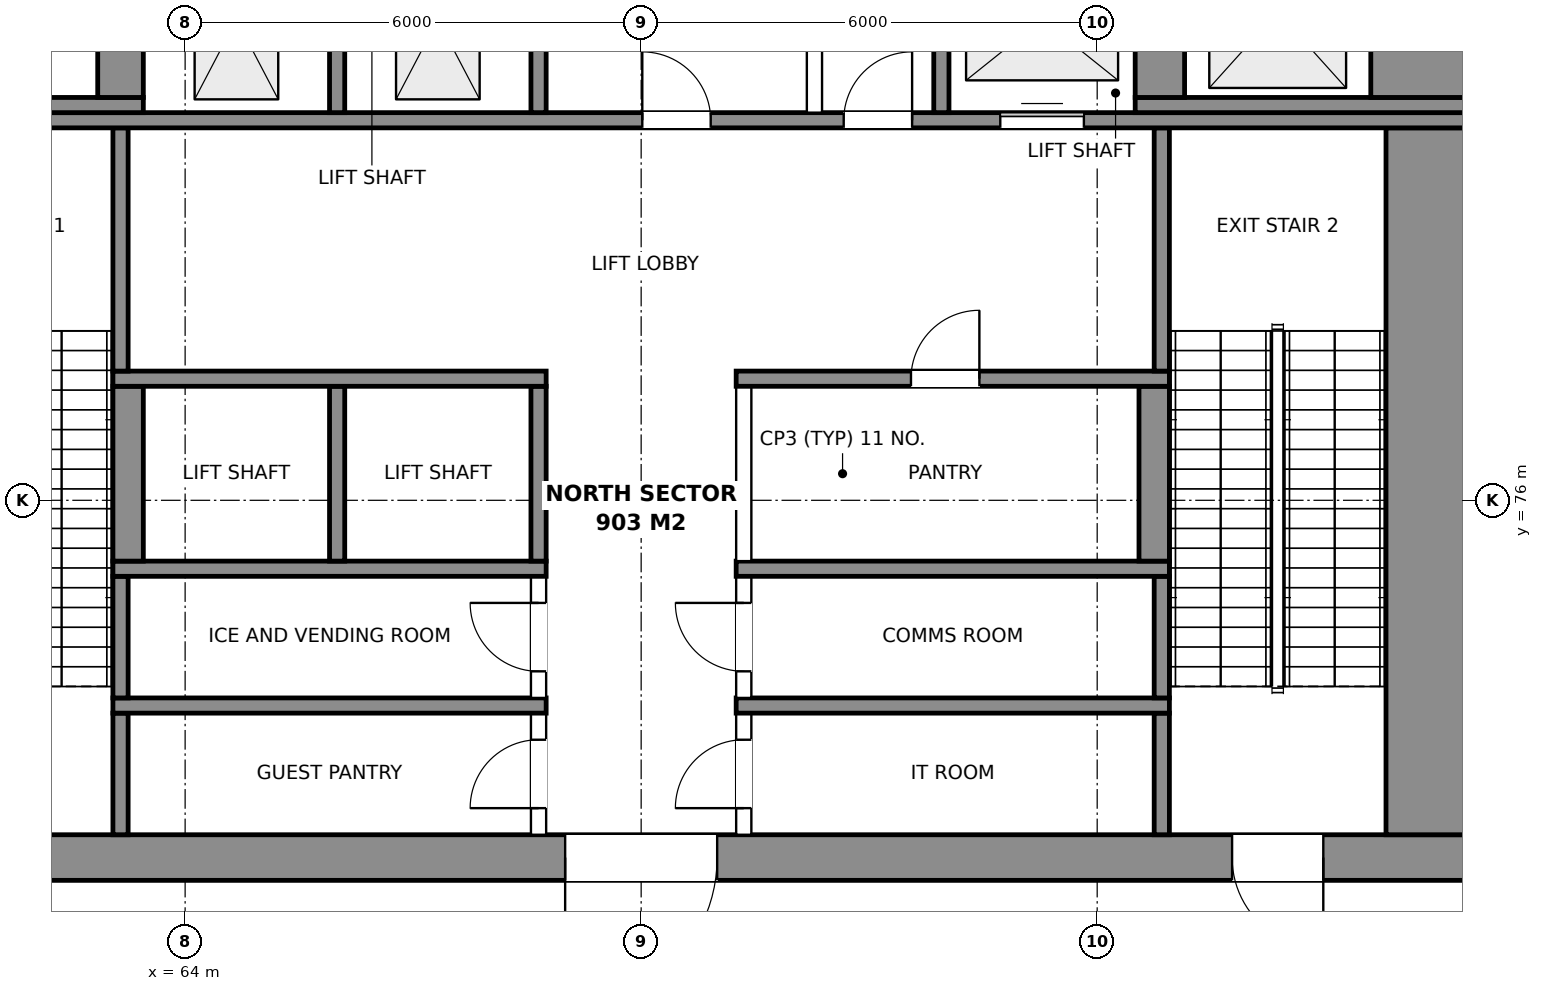
"""IFC4 building model, lengths in metres.
Left out: names, types, materials, properties, quantities, classifications, styles, units other than length and angle.
Written with IfcOpenShell. Run it as: python <this file> out.ifc"""

import sys

from ifc_helpers import new_model, si_unit, direction, frame, frame_2d, origin, place, context, subcontext, project, spatial, rectangle, extrude, element, fill, save


model = new_model("IFC4")
c1 = context("Model", 3, precision=1e-05, world=origin(), true_north=direction((0.0, 1.0)))
c2 = subcontext(c1, "Body", "Model", "MODEL_VIEW")
j1 = project(units=[si_unit("LENGTHUNIT", "METRE"), si_unit("PLANEANGLEUNIT", "RADIAN")], contexts=[c1])
p1 = place(None, origin())
s1 = spatial("IfcSite", under=j1, at=p1, CompositionType="ELEMENT")
p2 = place(p1, origin())
s2 = spatial("IfcBuilding", under=s1, at=p2, CompositionType="ELEMENT")
p3 = place(p2, frame((0.0, 0.0, 321.7)))
s3 = spatial("IfcBuildingStorey", under=s2, at=p3, CompositionType="ELEMENT", Elevation=321.7)
p4 = place(p3, frame((59.0, 71.3, 0.0), z_axis=(0.0, 0.0, 1.0), x_axis=(1.0, 0.0, 0.0)))
e1 = element("IfcWall", 1, at=p4, inside=s3, PredefinedType="SHEAR", context=c2, shape_type="SweptSolid", body=[
    extrude(rectangle(XDim=22.0, YDim=0.6, at=frame_2d((11.0, 0.0))), origin(), (0.0, 0.0, 1.0), 7.0),
])
p5 = place(p4, frame((2.025, 0.0, 0.0)))
e2 = element("IfcOpeningElement", 2, at=p5, cuts=e1, PredefinedType="OPENING", context=c2, shape_type="SweptSolid", body=[
    extrude(rectangle(XDim=1.2, YDim=2.1, at=frame_2d((0.6, 1.05))), frame((0.0, 0.31, 0.0), z_axis=(0.0, -1.0, 0.0), x_axis=(1.0, 0.0, 0.0)), (0.0, 0.0, 1.0), 0.62),
])
p6 = place(p4, frame((18.775, 0.0, 0.0)))
e3 = element("IfcOpeningElement", 3, at=p6, cuts=e1, PredefinedType="OPENING", context=c2, shape_type="SweptSolid", body=[
    extrude(rectangle(XDim=1.2, YDim=2.1, at=frame_2d((0.6, 1.05))), frame((0.0, 0.31, 0.0), z_axis=(0.0, -1.0, 0.0), x_axis=(1.0, 0.0, 0.0)), (0.0, 0.0, 1.0), 0.62),
])
p7 = place(p4, frame((10.0, 0.0, 0.0)))
e4 = element("IfcOpeningElement", 4, at=p7, cuts=e1, PredefinedType="OPENING", context=c2, shape_type="SweptSolid", body=[
    extrude(rectangle(XDim=2.0, YDim=2.1, at=frame_2d((1.0, 1.05))), frame((0.0, 0.31, 0.0), z_axis=(0.0, -1.0, 0.0), x_axis=(1.0, 0.0, 0.0)), (0.0, 0.0, 1.0), 0.62),
])
p8 = place(p3, frame((63.15, 71.6, 0.0), z_axis=(0.0, 0.0, 1.0), x_axis=(0.0, 1.0, 0.0)))
e5 = element("IfcWall", 5, at=p8, inside=s3, PredefinedType="SHEAR", context=c2, shape_type="SweptSolid", body=[
    extrude(rectangle(XDim=1.6, YDim=0.2, at=frame_2d((0.8, 0.0))), origin(), (0.0, 0.0, 1.0), 7.0),
])
p9 = place(p3, frame((68.65, 71.6, 0.0), z_axis=(0.0, 0.0, 1.0), x_axis=(0.0, 1.0, 0.0)))
e6 = element("IfcWall", 6, at=p9, inside=s3, PredefinedType="PARTITIONING", context=c2, shape_type="SweptSolid", body=[
    extrude(rectangle(XDim=1.6, YDim=0.2, at=frame_2d((0.8, 0.0))), origin(), (0.0, 0.0, 1.0), 6.7),
])
p10 = place(p9, frame((0.35, 0.0, 0.0)))
e7 = element("IfcOpeningElement", 7, at=p10, cuts=e6, PredefinedType="OPENING", context=c2, shape_type="SweptSolid", body=[
    extrude(rectangle(XDim=0.9, YDim=2.1, at=frame_2d((0.45, 1.05))), frame((0.0, 0.11, 0.0), z_axis=(0.0, -1.0, 0.0), x_axis=(1.0, 0.0, 0.0)), (0.0, 0.0, 1.0), 0.22),
])
p11 = place(p3, frame((71.35, 71.6, 0.0), z_axis=(0.0, 0.0, 1.0), x_axis=(0.0, 1.0, 0.0)))
e8 = element("IfcWall", 8, at=p11, inside=s3, PredefinedType="PARTITIONING", context=c2, shape_type="SweptSolid", body=[
    extrude(rectangle(XDim=1.6, YDim=0.2, at=frame_2d((0.8, 0.0))), origin(), (0.0, 0.0, 1.0), 6.7),
])
p12 = place(p11, frame((0.35, 0.0, 0.0)))
e9 = element("IfcOpeningElement", 9, at=p12, cuts=e8, PredefinedType="OPENING", context=c2, shape_type="SweptSolid", body=[
    extrude(rectangle(XDim=0.9, YDim=2.1, at=frame_2d((0.45, 1.05))), frame((0.0, 0.11, 0.0), z_axis=(0.0, -1.0, 0.0), x_axis=(1.0, 0.0, 0.0)), (0.0, 0.0, 1.0), 0.22),
])
p13 = place(p3, frame((76.85, 71.6, 0.0), z_axis=(0.0, 0.0, 1.0), x_axis=(0.0, 1.0, 0.0)))
e10 = element("IfcWall", 10, at=p13, inside=s3, PredefinedType="SHEAR", context=c2, shape_type="SweptSolid", body=[
    extrude(rectangle(XDim=1.6, YDim=0.2, at=frame_2d((0.8, 0.0))), origin(), (0.0, 0.0, 1.0), 7.0),
])
p14 = place(p3, frame((80.4, 71.6, 0.0), z_axis=(0.0, 0.0, 1.0), x_axis=(0.0, 1.0, 0.0)))
e11 = element("IfcWall", 11, at=p14, inside=s3, PredefinedType="SHEAR", context=c2, shape_type="SweptSolid", body=[
    extrude(rectangle(XDim=9.3, YDim=1.2, at=frame_2d((4.65, 0.0))), origin(), (0.0, 0.0, 1.0), 7.0),
])
for number, where, z_axis, x_axis in (
    (12, (63.05, 73.3, 0.0), (0.0, 0.0, 1.0), (1.0, 0.0, 0.0)),
    (13, (71.25, 73.3, 0.0), (0.0, 0.0, 1.0), (1.0, 0.0, 0.0)),
):
    element("IfcWall", number, at=place(p3, frame(where, z_axis=z_axis, x_axis=x_axis)), inside=s3, PredefinedType="SHEAR", context=c2, shape_type="SweptSolid", body=[
        extrude(rectangle(XDim=5.7, YDim=0.2, at=frame_2d((2.85, 0.0))), origin(), (0.0, 0.0, 1.0), 7.0),
    ])
p15 = place(p3, frame((63.15, 73.4, 0.0), z_axis=(0.0, 0.0, 1.0), x_axis=(0.0, 1.0, 0.0)))
e14 = element("IfcWall", 14, at=p15, inside=s3, PredefinedType="SHEAR", context=c2, shape_type="SweptSolid", body=[
    extrude(rectangle(XDim=1.6, YDim=0.2, at=frame_2d((0.8, 0.0))), origin(), (0.0, 0.0, 1.0), 7.0),
])
p16 = place(p3, frame((68.65, 73.4, 0.0), z_axis=(0.0, 0.0, 1.0), x_axis=(0.0, 1.0, 0.0)))
e15 = element("IfcWall", 15, at=p16, inside=s3, PredefinedType="PARTITIONING", context=c2, shape_type="SweptSolid", body=[
    extrude(rectangle(XDim=1.6, YDim=0.2, at=frame_2d((0.8, 0.0))), origin(), (0.0, 0.0, 1.0), 6.7),
])
p17 = place(p16, frame((0.35, 0.0, 0.0)))
e16 = element("IfcOpeningElement", 16, at=p17, cuts=e15, PredefinedType="OPENING", context=c2, shape_type="SweptSolid", body=[
    extrude(rectangle(XDim=0.9, YDim=2.1, at=frame_2d((0.45, 1.05))), frame((0.0, 0.11, 0.0), z_axis=(0.0, -1.0, 0.0), x_axis=(1.0, 0.0, 0.0)), (0.0, 0.0, 1.0), 0.22),
])
p18 = place(p3, frame((71.35, 73.4, 0.0), z_axis=(0.0, 0.0, 1.0), x_axis=(0.0, 1.0, 0.0)))
e17 = element("IfcWall", 17, at=p18, inside=s3, PredefinedType="PARTITIONING", context=c2, shape_type="SweptSolid", body=[
    extrude(rectangle(XDim=1.6, YDim=0.2, at=frame_2d((0.8, 0.0))), origin(), (0.0, 0.0, 1.0), 6.7),
])
p19 = place(p18, frame((0.35, 0.0, 0.0)))
e18 = element("IfcOpeningElement", 18, at=p19, cuts=e17, PredefinedType="OPENING", context=c2, shape_type="SweptSolid", body=[
    extrude(rectangle(XDim=0.9, YDim=2.1, at=frame_2d((0.45, 1.05))), frame((0.0, 0.11, 0.0), z_axis=(0.0, -1.0, 0.0), x_axis=(1.0, 0.0, 0.0)), (0.0, 0.0, 1.0), 0.22),
])
p20 = place(p3, frame((76.85, 73.4, 0.0), z_axis=(0.0, 0.0, 1.0), x_axis=(0.0, 1.0, 0.0)))
e19 = element("IfcWall", 19, at=p20, inside=s3, PredefinedType="SHEAR", context=c2, shape_type="SweptSolid", body=[
    extrude(rectangle(XDim=1.6, YDim=0.2, at=frame_2d((0.8, 0.0))), origin(), (0.0, 0.0, 1.0), 7.0),
])
for number, where, z_axis, x_axis in (
    (20, (63.05, 75.1, 0.0), (0.0, 0.0, 1.0), (1.0, 0.0, 0.0)),
    (21, (71.25, 75.1, 0.0), (0.0, 0.0, 1.0), (1.0, 0.0, 0.0)),
):
    element("IfcWall", number, at=place(p3, frame(where, z_axis=z_axis, x_axis=x_axis)), inside=s3, PredefinedType="SHEAR", context=c2, shape_type="SweptSolid", body=[
        extrude(rectangle(XDim=5.7, YDim=0.2, at=frame_2d((2.85, 0.0))), origin(), (0.0, 0.0, 1.0), 7.0),
    ])
p21 = place(p3, frame((63.25, 75.2, 0.0), z_axis=(0.0, 0.0, 1.0), x_axis=(0.0, 1.0, 0.0)))
e22 = element("IfcWall", 22, at=p21, inside=s3, PredefinedType="SHEAR", context=c2, shape_type="SweptSolid", body=[
    extrude(rectangle(XDim=2.3, YDim=0.4, at=frame_2d((1.15, 0.0))), origin(), (0.0, 0.0, 1.0), 7.0),
])
for number, where, z_axis, x_axis in (
    (23, (66.0, 75.2, 0.0), (0.0, 0.0, 1.0), (0.0, 1.0, 0.0)),
    (24, (68.65, 75.2, 0.0), (0.0, 0.0, 1.0), (0.0, 1.0, 0.0)),
):
    element("IfcWall", number, at=place(p3, frame(where, z_axis=z_axis, x_axis=x_axis)), inside=s3, PredefinedType="SHEAR", context=c2, shape_type="SweptSolid", body=[
        extrude(rectangle(XDim=2.3, YDim=0.2, at=frame_2d((1.15, 0.0))), origin(), (0.0, 0.0, 1.0), 7.0),
    ])
p22 = place(p3, frame((71.35, 75.2, 0.0), z_axis=(0.0, 0.0, 1.0), x_axis=(0.0, 1.0, 0.0)))
e25 = element("IfcWall", 25, at=p22, inside=s3, PredefinedType="PARTITIONING", context=c2, shape_type="SweptSolid", body=[
    extrude(rectangle(XDim=2.3, YDim=0.2, at=frame_2d((1.15, 0.0))), origin(), (0.0, 0.0, 1.0), 6.7),
])
p23 = place(p3, frame((76.75, 75.2, 0.0), z_axis=(0.0, 0.0, 1.0), x_axis=(0.0, 1.0, 0.0)))
e26 = element("IfcWall", 26, at=p23, inside=s3, PredefinedType="SHEAR", context=c2, shape_type="SweptSolid", body=[
    extrude(rectangle(XDim=2.3, YDim=0.4, at=frame_2d((1.15, 0.0))), origin(), (0.0, 0.0, 1.0), 7.0),
])
p24 = place(p3, frame((63.05, 77.6, 0.0), z_axis=(0.0, 0.0, 1.0), x_axis=(1.0, 0.0, 0.0)))
e27 = element("IfcWall", 27, at=p24, inside=s3, PredefinedType="SHEAR", context=c2, shape_type="SweptSolid", body=[
    extrude(rectangle(XDim=5.7, YDim=0.2, at=frame_2d((2.85, 0.0))), origin(), (0.0, 0.0, 1.0), 7.0),
])
p25 = place(p3, frame((71.25, 77.6, 0.0), z_axis=(0.0, 0.0, 1.0), x_axis=(1.0, 0.0, 0.0)))
e28 = element("IfcWall", 28, at=p25, inside=s3, PredefinedType="SHEAR", context=c2, shape_type="SweptSolid", body=[
    extrude(rectangle(XDim=5.7, YDim=0.2, at=frame_2d((2.85, 0.0))), origin(), (0.0, 0.0, 1.0), 7.0),
])
p26 = place(p25, frame((2.3, 0.0, 0.0)))
e29 = element("IfcOpeningElement", 29, at=p26, cuts=e28, PredefinedType="OPENING", context=c2, shape_type="SweptSolid", body=[
    extrude(rectangle(XDim=0.9, YDim=2.1, at=frame_2d((0.45, 1.05))), frame((0.0, 0.11, 0.0), z_axis=(0.0, -1.0, 0.0), x_axis=(1.0, 0.0, 0.0)), (0.0, 0.0, 1.0), 0.22),
])
for number, where, z_axis, x_axis in (
    (30, (63.15, 77.7, 0.0), (0.0, 0.0, 1.0), (0.0, 1.0, 0.0)),
    (31, (76.85, 77.7, 0.0), (0.0, 0.0, 1.0), (0.0, 1.0, 0.0)),
):
    element("IfcWall", number, at=place(p3, frame(where, z_axis=z_axis, x_axis=x_axis)), inside=s3, PredefinedType="SHEAR", context=c2, shape_type="SweptSolid", body=[
        extrude(rectangle(XDim=3.2, YDim=0.2, at=frame_2d((1.6, 0.0))), origin(), (0.0, 0.0, 1.0), 7.0),
    ])
p27 = place(p3, frame((59.0, 81.0, 0.0), z_axis=(0.0, 0.0, 1.0), x_axis=(1.0, 0.0, 0.0)))
e32 = element("IfcWall", 32, at=p27, inside=s3, PredefinedType="SHEAR", context=c2, shape_type="SweptSolid", body=[
    extrude(rectangle(XDim=22.0, YDim=0.2, at=frame_2d((11.0, 0.0))), origin(), (0.0, 0.0, 1.0), 7.0),
])
p28 = place(p27, frame((15.725, 0.0, 0.0)))
e33 = element("IfcOpeningElement", 33, at=p28, cuts=e32, PredefinedType="OPENING", context=c2, shape_type="SweptSolid", body=[
    extrude(rectangle(XDim=1.1, YDim=2.1, at=frame_2d((0.55, 1.05))), frame((0.0, 0.11, 0.0), z_axis=(0.0, -1.0, 0.0), x_axis=(1.0, 0.0, 0.0)), (0.0, 0.0, 1.0), 0.22),
])
p29 = place(p27, frame((11.015, 0.0, 0.0)))
e34 = element("IfcOpeningElement", 34, at=p29, cuts=e32, PredefinedType="OPENING", context=c2, shape_type="SweptSolid", body=[
    extrude(rectangle(XDim=0.9, YDim=2.1, at=frame_2d((0.45, 1.05))), frame((0.0, 0.11, 0.0), z_axis=(0.0, -1.0, 0.0), x_axis=(1.0, 0.0, 0.0)), (0.0, 0.0, 1.0), 0.22),
])
p30 = place(p27, frame((13.665, 0.0, 0.0)))
e35 = element("IfcOpeningElement", 35, at=p30, cuts=e32, PredefinedType="OPENING", context=c2, shape_type="SweptSolid", body=[
    extrude(rectangle(XDim=0.9, YDim=2.1, at=frame_2d((0.45, 1.05))), frame((0.0, 0.11, 0.0), z_axis=(0.0, -1.0, 0.0), x_axis=(1.0, 0.0, 0.0)), (0.0, 0.0, 1.0), 0.22),
])
p31 = place(p3, frame((59.0, 81.2, 0.0), z_axis=(0.0, 0.0, 1.0), x_axis=(1.0, 0.0, 0.0)))
e36 = element("IfcWall", 36, at=p31, inside=s3, PredefinedType="SHEAR", context=c2, shape_type="SweptSolid", body=[
    extrude(rectangle(XDim=4.45, YDim=0.2, at=frame_2d((2.225, 0.0))), origin(), (0.0, 0.0, 1.0), 7.0),
])
for number, where, z_axis, x_axis in (
    (37, (66.0, 81.1, 0.0), (0.0, 0.0, 1.0), (0.0, 1.0, 0.0)),
    (38, (68.65, 81.1, 0.0), (0.0, 0.0, 1.0), (0.0, 1.0, 0.0)),
):
    element("IfcWall", number, at=place(p3, frame(where, z_axis=z_axis, x_axis=x_axis)), inside=s3, PredefinedType="SHEAR", context=c2, shape_type="SweptSolid", body=[
        extrude(rectangle(XDim=2.45, YDim=0.2, at=frame_2d((1.225, 0.0))), origin(), (0.0, 0.0, 1.0), 7.0),
    ])
p32 = place(p3, frame((72.28, 81.1, 0.0), z_axis=(0.0, 0.0, 1.0), x_axis=(0.0, 1.0, 0.0)))
e39 = element("IfcWall", 39, at=p32, inside=s3, PredefinedType="PARTITIONING", context=c2, shape_type="SweptSolid", body=[
    extrude(rectangle(XDim=2.45, YDim=0.2, at=frame_2d((1.225, 0.0))), origin(), (0.0, 0.0, 1.0), 6.7),
])
p33 = place(p3, frame((73.95, 81.1, 0.0), z_axis=(0.0, 0.0, 1.0), x_axis=(0.0, 1.0, 0.0)))
e40 = element("IfcWall", 40, at=p33, inside=s3, PredefinedType="SHEAR", context=c2, shape_type="SweptSolid", body=[
    extrude(rectangle(XDim=2.45, YDim=0.2, at=frame_2d((1.225, 0.0))), origin(), (0.0, 0.0, 1.0), 7.0),
])
p34 = place(p3, frame((76.5, 81.2, 0.0), z_axis=(0.0, 0.0, 1.0), x_axis=(1.0, 0.0, 0.0)))
e41 = element("IfcWall", 41, at=p34, inside=s3, PredefinedType="SHEAR", context=c2, shape_type="SweptSolid", body=[
    extrude(rectangle(XDim=4.5, YDim=0.2, at=frame_2d((2.25, 0.0))), origin(), (0.0, 0.0, 1.0), 7.0),
])
p35 = place(p3, frame((63.15, 81.3, 0.0), z_axis=(0.0, 0.0, 1.0), x_axis=(0.0, 1.0, 0.0)))
e42 = element("IfcWall", 42, at=p35, inside=s3, PredefinedType="SHEAR", context=c2, shape_type="SweptSolid", body=[
    extrude(rectangle(XDim=2.25, YDim=0.6, at=frame_2d((1.125, 0.0))), origin(), (0.0, 0.0, 1.0), 7.0),
])
p36 = place(p3, frame((76.825, 81.3, 0.0), z_axis=(0.0, 0.0, 1.0), x_axis=(0.0, 1.0, 0.0)))
e43 = element("IfcWall", 43, at=p36, inside=s3, PredefinedType="SHEAR", context=c2, shape_type="SweptSolid", body=[
    extrude(rectangle(XDim=2.25, YDim=0.65, at=frame_2d((1.125, 0.0))), origin(), (0.0, 0.0, 1.0), 7.0),
])
p37 = place(p3, frame((80.3, 81.3, 0.0), z_axis=(0.0, 0.0, 1.0), x_axis=(0.0, 1.0, 0.0)))
e44 = element("IfcWall", 44, at=p37, inside=s3, PredefinedType="SHEAR", context=c2, shape_type="SweptSolid", body=[
    extrude(rectangle(XDim=2.25, YDim=1.4, at=frame_2d((1.125, 0.0))), origin(), (0.0, 0.0, 1.0), 7.0),
])
p38 = place(p6, frame((1.2, 0.0, 0.0), z_axis=(0.0, 0.0, 1.0), x_axis=(-1.0, 0.0, 0.0)))
e45 = element("IfcDoor", 45, at=p38, inside=s3, OperationType="SINGLE_SWING_LEFT", PredefinedType="DOOR", context=c2, shape_type="SweptSolid", body=[
    extrude(rectangle(XDim=1.2, YDim=2.1, at=frame_2d((0.6, 1.05))), frame((0.0, 0.025, 0.0), z_axis=(0.0, -1.0, 0.0), x_axis=(1.0, 0.0, 0.0)), (0.0, 0.0, 1.0), 0.05),
])
fill(e3, e45)
p39 = place(p7, frame((2.0, 0.0, 0.0), z_axis=(0.0, 0.0, 1.0), x_axis=(-1.0, 0.0, 0.0)))
e46 = element("IfcDoor", 46, at=p39, inside=s3, OperationType="DOUBLE_DOOR_SINGLE_SWING", PredefinedType="DOOR", context=c2, shape_type="SweptSolid", body=[
    extrude(rectangle(XDim=2.0, YDim=2.1, at=frame_2d((1.0, 1.05))), frame((0.0, 0.025, 0.0), z_axis=(0.0, -1.0, 0.0), x_axis=(1.0, 0.0, 0.0)), (0.0, 0.0, 1.0), 0.05),
])
fill(e4, e46)
p40 = place(p10, origin())
e47 = element("IfcDoor", 47, at=p40, inside=s3, OperationType="SINGLE_SWING_LEFT", PredefinedType="DOOR", context=c2, shape_type="SweptSolid", body=[
    extrude(rectangle(XDim=0.9, YDim=2.1, at=frame_2d((0.45, 1.05))), frame((0.0, 0.025, 0.0), z_axis=(0.0, -1.0, 0.0), x_axis=(1.0, 0.0, 0.0)), (0.0, 0.0, 1.0), 0.05),
])
fill(e7, e47)
p41 = place(p17, origin())
e48 = element("IfcDoor", 48, at=p41, inside=s3, OperationType="SINGLE_SWING_RIGHT", PredefinedType="DOOR", context=c2, shape_type="SweptSolid", body=[
    extrude(rectangle(XDim=0.9, YDim=2.1, at=frame_2d((0.45, 1.05))), frame((0.0, 0.025, 0.0), z_axis=(0.0, -1.0, 0.0), x_axis=(1.0, 0.0, 0.0)), (0.0, 0.0, 1.0), 0.05),
])
fill(e16, e48)
p42 = place(p12, origin())
e49 = element("IfcDoor", 49, at=p42, inside=s3, OperationType="SINGLE_SWING_LEFT", PredefinedType="DOOR", context=c2, shape_type="SweptSolid", body=[
    extrude(rectangle(XDim=0.9, YDim=2.1, at=frame_2d((0.45, 1.05))), frame((0.0, 0.025, 0.0), z_axis=(0.0, -1.0, 0.0), x_axis=(1.0, 0.0, 0.0)), (0.0, 0.0, 1.0), 0.05),
])
fill(e9, e49)
p43 = place(p19, origin())
e50 = element("IfcDoor", 50, at=p43, inside=s3, OperationType="SINGLE_SWING_RIGHT", PredefinedType="DOOR", context=c2, shape_type="SweptSolid", body=[
    extrude(rectangle(XDim=0.9, YDim=2.1, at=frame_2d((0.45, 1.05))), frame((0.0, 0.025, 0.0), z_axis=(0.0, -1.0, 0.0), x_axis=(1.0, 0.0, 0.0)), (0.0, 0.0, 1.0), 0.05),
])
fill(e18, e50)
p44 = place(p28, origin())
e51 = element("IfcDoor", 51, at=p44, inside=s3, OperationType="DOUBLE_DOOR_SLIDING", PredefinedType="DOOR", context=c2, shape_type="SweptSolid", body=[
    extrude(rectangle(XDim=1.1, YDim=2.1, at=frame_2d((0.55, 1.05))), frame((0.0, 0.025, 0.0), z_axis=(0.0, -1.0, 0.0), x_axis=(1.0, 0.0, 0.0)), (0.0, 0.0, 1.0), 0.05),
])
fill(e33, e51)
p45 = place(p26, origin())
e52 = element("IfcDoor", 52, at=p45, inside=s3, OperationType="SINGLE_SWING_RIGHT", PredefinedType="DOOR", context=c2, shape_type="SweptSolid", body=[
    extrude(rectangle(XDim=0.9, YDim=2.1, at=frame_2d((0.45, 1.05))), frame((0.0, 0.025, 0.0), z_axis=(0.0, -1.0, 0.0), x_axis=(1.0, 0.0, 0.0)), (0.0, 0.0, 1.0), 0.05),
])
fill(e29, e52)
p46 = place(p29, origin())
e53 = element("IfcDoor", 53, at=p46, inside=s3, OperationType="SINGLE_SWING_LEFT", PredefinedType="DOOR", context=c2, shape_type="SweptSolid", body=[
    extrude(rectangle(XDim=0.9, YDim=2.1, at=frame_2d((0.45, 1.05))), frame((0.0, 0.025, 0.0), z_axis=(0.0, -1.0, 0.0), x_axis=(1.0, 0.0, 0.0)), (0.0, 0.0, 1.0), 0.05),
])
fill(e34, e53)
p47 = place(p30, origin())
e54 = element("IfcDoor", 54, at=p47, inside=s3, OperationType="SINGLE_SWING_RIGHT", PredefinedType="DOOR", context=c2, shape_type="SweptSolid", body=[
    extrude(rectangle(XDim=0.9, YDim=2.1, at=frame_2d((0.45, 1.05))), frame((0.0, 0.025, 0.0), z_axis=(0.0, -1.0, 0.0), x_axis=(1.0, 0.0, 0.0)), (0.0, 0.0, 1.0), 0.05),
])
fill(e35, e54)
save(model, sys.argv[1])
